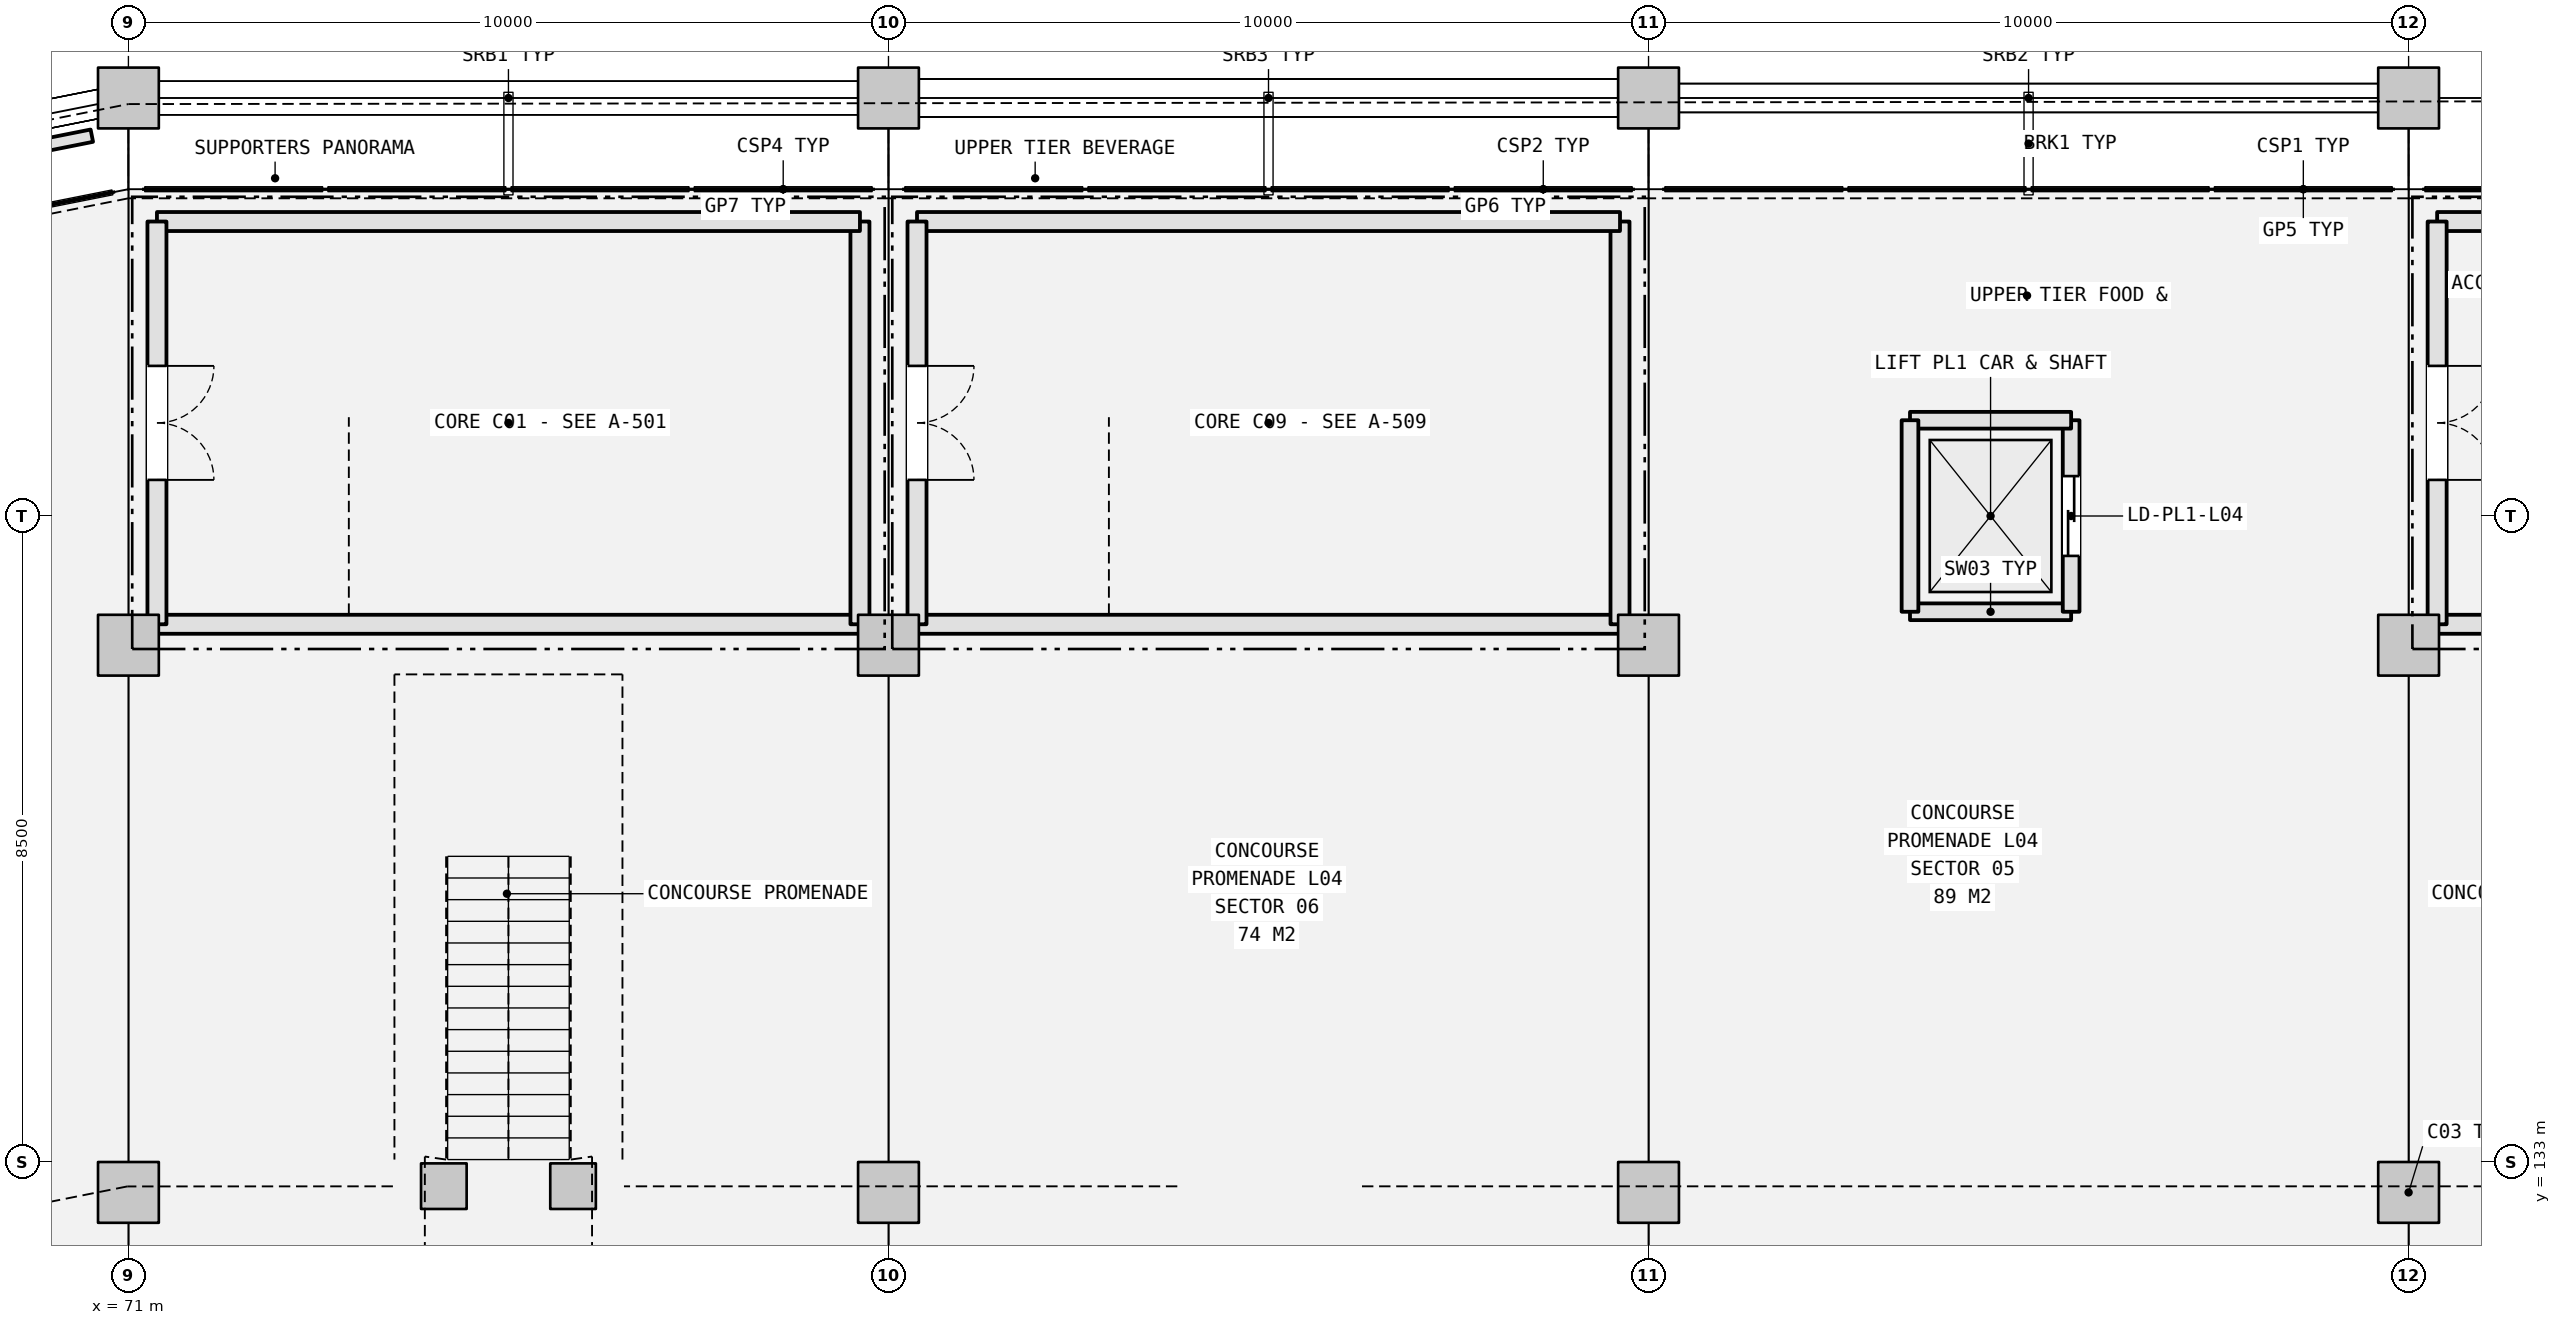
"""IFC4 building model, lengths in metres.
Left out: names, types, materials, properties, quantities, classifications, styles, units other than length and angle.
Written with IfcOpenShell. Run it as: python <this file> out.ifc"""

import sys

from ifc_helpers import new_model, si_unit, direction, frame, frame_2d, origin, origin_2d, place, context, subcontext, project, spatial, rectangle, extrude, element, fill, save


model = new_model("IFC4")
c1 = context("Model", 3, precision=1e-05, world=origin(), true_north=direction((0.0, 1.0)))
c2 = subcontext(c1, "Body", "Model", "MODEL_VIEW")
j1 = project(units=[si_unit("LENGTHUNIT", "METRE"), si_unit("PLANEANGLEUNIT", "RADIAN")], contexts=[c1])
p1 = place(None, origin())
s1 = spatial("IfcSite", under=j1, at=p1, CompositionType="ELEMENT")
p2 = place(p1, origin())
s2 = spatial("IfcBuilding", under=s1, at=p2, CompositionType="ELEMENT")
p3 = place(p2, frame((0.0, 0.0, 21.6)))
s3 = spatial("IfcBuildingStorey", under=s2, at=p3, CompositionType="ELEMENT", Elevation=21.6)
for number, where, z_axis, x_axis in (
    (1, (101.0, 132.6, 0.0), (0.0, 0.0, 1.0), (1.0, 0.0, 0.0)),
    (2, (101.0, 139.8, 0.0), (0.0, 0.0, 1.0), (1.0, 0.0, 0.0)),
    (3, (101.0, 147.0, 0.0), (0.0, 0.0, 1.0), (1.0, 0.0, 0.0)),
    (4, (91.0, 132.6, 0.0), (0.0, 0.0, 1.0), (1.0, 0.0, 0.0)),
    (5, (91.0, 139.8, 0.0), (0.0, 0.0, 1.0), (1.0, 0.0, 0.0)),
    (6, (91.0, 147.0, 0.0), (0.0, 0.0, 1.0), (1.0, 0.0, 0.0)),
    (7, (81.0, 132.6, 0.0), (0.0, 0.0, 1.0), (1.0, 0.0, 0.0)),
    (8, (81.0, 139.8, 0.0), (0.0, 0.0, 1.0), (1.0, 0.0, 0.0)),
    (9, (81.0, 147.0, 0.0), (0.0, 0.0, 1.0), (1.0, 0.0, 0.0)),
    (10, (71.0, 132.6, 0.0), (0.0, 0.0, 1.0), (1.0, 0.0, 0.0)),
    (11, (71.0, 139.8, 0.0), (0.0, 0.0, 1.0), (1.0, 0.0, 0.0)),
    (12, (71.0, 147.0, 0.0), (0.0, 0.0, 1.0), (1.0, 0.0, 0.0)),
):
    element("IfcColumn", number, at=place(p3, frame(where, z_axis=z_axis, x_axis=x_axis)), inside=s3, PredefinedType="COLUMN", context=c2, shape_type="SweptSolid", body=[
        extrude(rectangle(XDim=0.8, YDim=0.8, at=origin_2d()), origin(), (0.0, 0.0, 1.0), 5.4),
    ])
p4 = place(p3, frame((71.375, 140.075, 0.0), z_axis=(0.0, 0.0, 1.0), x_axis=(1.0, 0.0, 0.0)))
e13 = element("IfcWall", 13, at=p4, inside=s3, PredefinedType="SHEAR", context=c2, shape_type="SweptSolid", body=[
    extrude(rectangle(XDim=9.249, YDim=0.25, at=frame_2d((4.625, 0.0))), origin(), (0.0, 0.0, 1.0), 5.15),
])
p5 = place(p3, frame((80.625, 140.075, 0.0), z_axis=(0.0, 0.0, 1.0), x_axis=(0.0, 1.0, 0.0)))
e14 = element("IfcWall", 14, at=p5, inside=s3, PredefinedType="SHEAR", context=c2, shape_type="SweptSolid", body=[
    extrude(rectangle(XDim=5.299, YDim=0.25, at=frame_2d((2.649, 0.0))), origin(), (0.0, 0.0, 1.0), 5.15),
])
p6 = place(p3, frame((80.625, 145.375, 0.0), z_axis=(0.0, 0.0, 1.0), x_axis=(-1.0, 0.0, 0.0)))
e15 = element("IfcWall", 15, at=p6, inside=s3, PredefinedType="SHEAR", context=c2, shape_type="SweptSolid", body=[
    extrude(rectangle(XDim=9.249, YDim=0.25, at=frame_2d((4.625, 0.0))), origin(), (0.0, 0.0, 1.0), 5.15),
])
p7 = place(p3, frame((71.375, 145.375, 0.0), z_axis=(0.0, 0.0, 1.0), x_axis=(0.0, -1.0, 0.0)))
e16 = element("IfcWall", 16, at=p7, inside=s3, PredefinedType="SHEAR", context=c2, shape_type="SweptSolid", body=[
    extrude(rectangle(XDim=5.299, YDim=0.25, at=frame_2d((2.649, 0.0))), origin(), (0.0, 0.0, 1.0), 5.15),
])
p8 = place(p7, frame((1.9, 0.0, 0.0)))
e17 = element("IfcOpeningElement", 17, at=p8, cuts=e16, PredefinedType="OPENING", context=c2, shape_type="SweptSolid", body=[
    extrude(rectangle(XDim=1.5, YDim=2.2, at=frame_2d((0.75, 1.1))), frame((0.0, 0.135, 0.0), z_axis=(0.0, -1.0, 0.0), x_axis=(1.0, 0.0, 0.0)), (0.0, 0.0, 1.0), 0.27),
])
p9 = place(p3, frame((81.375, 140.075, 0.0), z_axis=(0.0, 0.0, 1.0), x_axis=(1.0, 0.0, 0.0)))
e18 = element("IfcWall", 18, at=p9, inside=s3, PredefinedType="SHEAR", context=c2, shape_type="SweptSolid", body=[
    extrude(rectangle(XDim=9.249, YDim=0.25, at=frame_2d((4.625, 0.0))), origin(), (0.0, 0.0, 1.0), 5.15),
])
p10 = place(p3, frame((90.625, 140.075, 0.0), z_axis=(0.0, 0.0, 1.0), x_axis=(0.0, 1.0, 0.0)))
e19 = element("IfcWall", 19, at=p10, inside=s3, PredefinedType="SHEAR", context=c2, shape_type="SweptSolid", body=[
    extrude(rectangle(XDim=5.299, YDim=0.25, at=frame_2d((2.649, 0.0))), origin(), (0.0, 0.0, 1.0), 5.15),
])
p11 = place(p3, frame((90.625, 145.375, 0.0), z_axis=(0.0, 0.0, 1.0), x_axis=(-1.0, 0.0, 0.0)))
e20 = element("IfcWall", 20, at=p11, inside=s3, PredefinedType="SHEAR", context=c2, shape_type="SweptSolid", body=[
    extrude(rectangle(XDim=9.249, YDim=0.25, at=frame_2d((4.625, 0.0))), origin(), (0.0, 0.0, 1.0), 5.15),
])
p12 = place(p3, frame((81.375, 145.375, 0.0), z_axis=(0.0, 0.0, 1.0), x_axis=(0.0, -1.0, 0.0)))
e21 = element("IfcWall", 21, at=p12, inside=s3, PredefinedType="SHEAR", context=c2, shape_type="SweptSolid", body=[
    extrude(rectangle(XDim=5.299, YDim=0.25, at=frame_2d((2.649, 0.0))), origin(), (0.0, 0.0, 1.0), 5.15),
])
p13 = place(p12, frame((1.9, 0.0, 0.0)))
e22 = element("IfcOpeningElement", 22, at=p13, cuts=e21, PredefinedType="OPENING", context=c2, shape_type="SweptSolid", body=[
    extrude(rectangle(XDim=1.5, YDim=2.2, at=frame_2d((0.75, 1.1))), frame((0.0, 0.135, 0.0), z_axis=(0.0, -1.0, 0.0), x_axis=(1.0, 0.0, 0.0)), (0.0, 0.0, 1.0), 0.27),
])
for number, where, z_axis, x_axis in (
    (23, (101.375, 140.075, 0.0), (0.0, 0.0, 1.0), (1.0, 0.0, 0.0)),
    (24, (110.625, 145.375, 0.0), (0.0, 0.0, 1.0), (-1.0, 0.0, 0.0)),
):
    element("IfcWall", number, at=place(p3, frame(where, z_axis=z_axis, x_axis=x_axis)), inside=s3, PredefinedType="SHEAR", context=c2, shape_type="SweptSolid", body=[
        extrude(rectangle(XDim=9.249, YDim=0.25, at=frame_2d((4.625, 0.0))), origin(), (0.0, 0.0, 1.0), 5.15),
    ])
p14 = place(p3, frame((101.375, 145.375, 0.0), z_axis=(0.0, 0.0, 1.0), x_axis=(0.0, -1.0, 0.0)))
e25 = element("IfcWall", 25, at=p14, inside=s3, PredefinedType="SHEAR", context=c2, shape_type="SweptSolid", body=[
    extrude(rectangle(XDim=5.299, YDim=0.25, at=frame_2d((2.649, 0.0))), origin(), (0.0, 0.0, 1.0), 5.15),
])
p15 = place(p14, frame((1.9, 0.0, 0.0)))
e26 = element("IfcOpeningElement", 26, at=p15, cuts=e25, PredefinedType="OPENING", context=c2, shape_type="SweptSolid", body=[
    extrude(rectangle(XDim=1.5, YDim=2.2, at=frame_2d((0.75, 1.1))), frame((0.0, 0.135, 0.0), z_axis=(0.0, -1.0, 0.0), x_axis=(1.0, 0.0, 0.0)), (0.0, 0.0, 1.0), 0.27),
])
for number, where, z_axis, x_axis in (
    (27, (75.15, 132.682, 0.0), (0.0, 0.0, 1.0), (1.0, 0.0, 0.0)),
    (28, (76.85, 132.682, 0.0), (0.0, 0.0, 1.0), (1.0, 0.0, 0.0)),
):
    element("IfcColumn", number, at=place(p3, frame(where, z_axis=z_axis, x_axis=x_axis)), inside=s3, PredefinedType="COLUMN", context=c2, shape_type="SweptSolid", body=[
        extrude(rectangle(XDim=0.6, YDim=0.6, at=origin_2d()), origin(), (0.0, 0.0, 1.0), 2.494),
    ])
p16 = place(p3, frame((94.44, 140.24, 0.0), z_axis=(0.0, 0.0, 1.0), x_axis=(1.0, 0.0, 0.0)))
e29 = element("IfcWall", 29, at=p16, inside=s3, PredefinedType="SHEAR", context=c2, shape_type="SweptSolid", body=[
    extrude(rectangle(XDim=2.12, YDim=0.22, at=frame_2d((1.06, 0.0))), origin(), (0.0, 0.0, 1.0), 5.15),
])
p17 = place(p3, frame((96.56, 140.24, 0.0), z_axis=(0.0, 0.0, 1.0), x_axis=(0.0, 1.0, 0.0)))
e30 = element("IfcWall", 30, at=p17, inside=s3, PredefinedType="SHEAR", context=c2, shape_type="SweptSolid", body=[
    extrude(rectangle(XDim=2.52, YDim=0.22, at=frame_2d((1.26, 0.0))), origin(), (0.0, 0.0, 1.0), 5.15),
])
p18 = place(p17, frame((0.735, 0.0, 0.0)))
e31 = element("IfcOpeningElement", 31, at=p18, cuts=e30, PredefinedType="OPENING", context=c2, shape_type="SweptSolid", body=[
    extrude(rectangle(XDim=1.05, YDim=2.15, at=frame_2d((0.525, 1.075))), frame((0.0, 0.12, 0.0), z_axis=(0.0, -1.0, 0.0), x_axis=(1.0, 0.0, 0.0)), (0.0, 0.0, 1.0), 0.24),
])
p19 = place(p3, frame((96.56, 142.76, 0.0), z_axis=(0.0, 0.0, 1.0), x_axis=(-1.0, 0.0, 0.0)))
e32 = element("IfcWall", 32, at=p19, inside=s3, PredefinedType="SHEAR", context=c2, shape_type="SweptSolid", body=[
    extrude(rectangle(XDim=2.12, YDim=0.22, at=frame_2d((1.06, 0.0))), origin(), (0.0, 0.0, 1.0), 5.15),
])
p20 = place(p3, frame((94.44, 142.76, 0.0), z_axis=(0.0, 0.0, 1.0), x_axis=(0.0, -1.0, 0.0)))
e33 = element("IfcWall", 33, at=p20, inside=s3, PredefinedType="SHEAR", context=c2, shape_type="SweptSolid", body=[
    extrude(rectangle(XDim=2.52, YDim=0.22, at=frame_2d((1.26, 0.0))), origin(), (0.0, 0.0, 1.0), 5.15),
])
p21 = place(p3, frame((51.695, 142.76, 0.0), z_axis=(0.0, 0.0, 1.0), x_axis=(0.98078659802, 0.195083697793, 0.0)))
e34 = element("IfcWall", 34, at=p21, inside=s3, PredefinedType="PARTITIONING", context=c2, shape_type="SweptSolid", body=[
    extrude(rectangle(XDim=19.192, YDim=0.165, at=frame_2d((9.596, 0.0))), origin(), (0.0, 0.0, 1.0), 2.772),
])
p22 = place(p8, origin())
e35 = element("IfcDoor", 35, at=p22, inside=s3, OperationType="DOUBLE_DOOR_SINGLE_SWING", PredefinedType="DOOR", context=c2, shape_type="SweptSolid", body=[
    extrude(rectangle(XDim=1.5, YDim=2.2, at=frame_2d((0.75, 1.1))), frame((0.0, 0.025, 0.0), z_axis=(0.0, -1.0, 0.0), x_axis=(1.0, 0.0, 0.0)), (0.0, 0.0, 1.0), 0.05),
])
fill(e17, e35)
p23 = place(p13, origin())
e36 = element("IfcDoor", 36, at=p23, inside=s3, OperationType="DOUBLE_DOOR_SINGLE_SWING", PredefinedType="DOOR", context=c2, shape_type="SweptSolid", body=[
    extrude(rectangle(XDim=1.5, YDim=2.2, at=frame_2d((0.75, 1.1))), frame((0.0, 0.025, 0.0), z_axis=(0.0, -1.0, 0.0), x_axis=(1.0, 0.0, 0.0)), (0.0, 0.0, 1.0), 0.05),
])
fill(e22, e36)
p24 = place(p15, origin())
e37 = element("IfcDoor", 37, at=p24, inside=s3, OperationType="DOUBLE_DOOR_SINGLE_SWING", PredefinedType="DOOR", context=c2, shape_type="SweptSolid", body=[
    extrude(rectangle(XDim=1.5, YDim=2.2, at=frame_2d((0.75, 1.1))), frame((0.0, 0.025, 0.0), z_axis=(0.0, -1.0, 0.0), x_axis=(1.0, 0.0, 0.0)), (0.0, 0.0, 1.0), 0.05),
])
fill(e26, e37)
p25 = place(p18, origin())
e38 = element("IfcDoor", 38, at=p25, inside=s3, OperationType="DOUBLE_DOOR_SLIDING", PredefinedType="DOOR", context=c2, shape_type="SweptSolid", body=[
    extrude(rectangle(XDim=1.05, YDim=2.15, at=frame_2d((0.525, 1.075))), frame((0.0, 0.025, 0.0), z_axis=(0.0, -1.0, 0.0), x_axis=(1.0, 0.0, 0.0)), (0.0, 0.0, 1.0), 0.05),
])
fill(e31, e38)
save(model, sys.argv[1])
